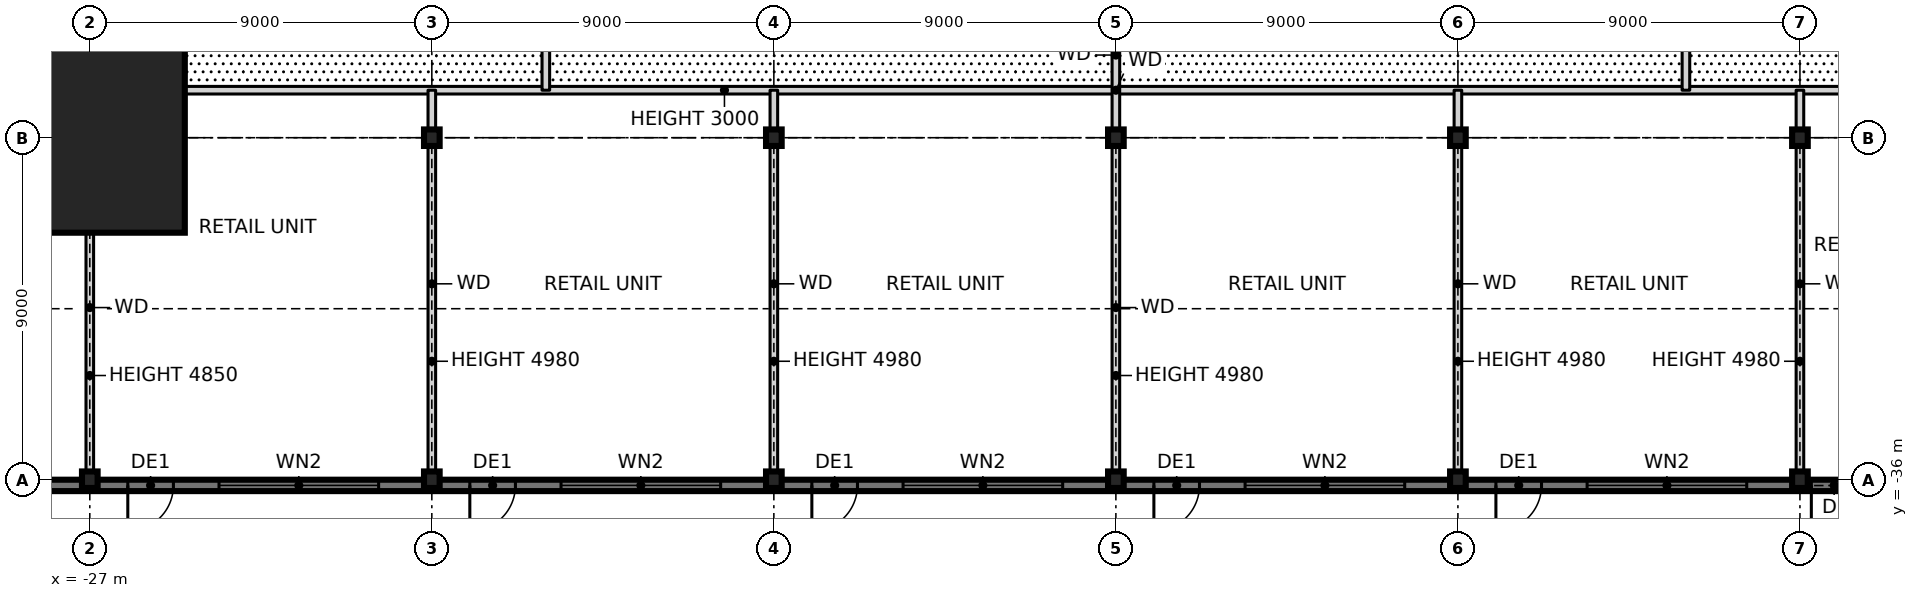
"""IFC4 building model, lengths in metres.
Left out: names, types, materials, properties, quantities, classifications, styles, units other than length and angle.
Written with IfcOpenShell. Run it as: python <this file> out.ifc"""

import sys

from ifc_helpers import new_model, si_unit, direction, frame, frame_2d, origin, origin_2d, place, context, subcontext, project, spatial, rectangle, i_section, extrude, element, fill, save


model = new_model("IFC4")
c1 = context("Model", 3, precision=1e-05, world=origin(), true_north=direction((0.0, 1.0)))
c2 = subcontext(c1, "Body", "Model", "MODEL_VIEW")
j1 = project(units=[si_unit("LENGTHUNIT", "METRE"), si_unit("PLANEANGLEUNIT", "RADIAN")], contexts=[c1])
p1 = place(None, origin())
s1 = spatial("IfcSite", under=j1, at=p1, CompositionType="ELEMENT")
p2 = place(p1, origin())
s2 = spatial("IfcBuilding", under=s1, at=p2, CompositionType="ELEMENT")
p3 = place(p2, origin())
s3 = spatial("IfcBuildingStorey", under=s2, at=p3, CompositionType="ELEMENT", Elevation=0.0)
p4 = place(p3, frame((-27.0, -27.0, 0.0), z_axis=(0.0, 0.0, 1.0), x_axis=(1.0, 0.0, 0.0)))
e1 = element("IfcColumn", 1, at=p4, inside=s3, PredefinedType="COLUMN", context=c2, shape_type="SweptSolid", body=[
    extrude(rectangle(XDim=5.0, YDim=5.0, at=origin_2d()), origin(), (0.0, 0.0, 1.0), 6.0),
    extrude(i_section(OverallWidth=0.478, OverallDepth=0.599, WebThickness=0.1, FlangeThickness=0.14, at=origin_2d()), origin(), (0.0, 0.0, 1.0), 6.0),
])
for number, where, z_axis, x_axis in (
    (2, (-27.0, -36.0, 0.0), (0.0, 0.0, 1.0), (1.0, 0.0, 0.0)),
    (3, (-18.0, -36.0, 0.0), (0.0, 0.0, 1.0), (1.0, 0.0, 0.0)),
    (4, (-18.0, -27.0, 0.0), (0.0, 0.0, 1.0), (1.0, 0.0, 0.0)),
    (5, (-9.0, -36.0, 0.0), (0.0, 0.0, 1.0), (1.0, 0.0, 0.0)),
    (6, (-9.0, -27.0, 0.0), (0.0, 0.0, 1.0), (1.0, 0.0, 0.0)),
    (7, (0.0, -36.0, 0.0), (0.0, 0.0, 1.0), (1.0, 0.0, 0.0)),
    (8, (0.0, -27.0, 0.0), (0.0, 0.0, 1.0), (1.0, 0.0, 0.0)),
    (9, (9.0, -36.0, 0.0), (0.0, 0.0, 1.0), (1.0, 0.0, 0.0)),
    (10, (9.0, -27.0, 0.0), (0.0, 0.0, 1.0), (1.0, 0.0, 0.0)),
    (11, (18.0, -36.0, 0.0), (0.0, 0.0, 1.0), (1.0, 0.0, 0.0)),
    (12, (18.0, -27.0, 0.0), (0.0, 0.0, 1.0), (1.0, 0.0, 0.0)),
):
    element("IfcColumn", number, at=place(p3, frame(where, z_axis=z_axis, x_axis=x_axis)), inside=s3, PredefinedType="COLUMN", context=c2, shape_type="SweptSolid", body=[
        extrude(i_section(OverallWidth=0.411, OverallDepth=0.434, WebThickness=0.036, FlangeThickness=0.057, at=origin_2d()), origin(), (0.0, 0.0, 1.0), 6.0),
    ])
p5 = place(p3, frame((-36.0, -36.15, -0.25), z_axis=(0.0, 0.0, 1.0), x_axis=(1.0, 0.0, 0.0)))
e13 = element("IfcWall", 13, at=p5, inside=s3, PredefinedType="SOLIDWALL", context=c2, shape_type="SweptSolid", body=[
    extrude(rectangle(XDim=9.0, YDim=0.3, at=frame_2d((4.5, 0.0))), origin(), (0.0, 0.0, 1.0), 6.25),
])
p6 = place(p5, frame((1.0, 0.0, 0.25)))
e14 = element("IfcOpeningElement", 14, at=p6, cuts=e13, PredefinedType="OPENING", context=c2, shape_type="SweptSolid", body=[
    extrude(rectangle(XDim=1.2, YDim=2.4, at=frame_2d((0.6, 1.2))), frame((0.0, 0.16, 0.0), z_axis=(0.0, -1.0, 0.0), x_axis=(1.0, 0.0, 0.0)), (0.0, 0.0, 1.0), 0.32),
])
p7 = place(p5, frame((3.4, 0.0, 0.85)))
e15 = element("IfcOpeningElement", 15, at=p7, cuts=e13, PredefinedType="OPENING", context=c2, shape_type="SweptSolid", body=[
    extrude(rectangle(XDim=4.2, YDim=3.6, at=frame_2d((2.1, 1.8))), frame((0.0, 0.16, 0.0), z_axis=(0.0, -1.0, 0.0), x_axis=(1.0, 0.0, 0.0)), (0.0, 0.0, 1.0), 0.32),
])
p8 = place(p3, frame((-27.0, -36.15, -0.25), z_axis=(0.0, 0.0, 1.0), x_axis=(1.0, 0.0, 0.0)))
e16 = element("IfcWall", 16, at=p8, inside=s3, PredefinedType="SOLIDWALL", context=c2, shape_type="SweptSolid", body=[
    extrude(rectangle(XDim=9.0, YDim=0.3, at=frame_2d((4.5, 0.0))), origin(), (0.0, 0.0, 1.0), 6.25),
])
p9 = place(p8, frame((1.0, 0.0, 0.25)))
e17 = element("IfcOpeningElement", 17, at=p9, cuts=e16, PredefinedType="OPENING", context=c2, shape_type="SweptSolid", body=[
    extrude(rectangle(XDim=1.2, YDim=2.4, at=frame_2d((0.6, 1.2))), frame((0.0, 0.16, 0.0), z_axis=(0.0, -1.0, 0.0), x_axis=(1.0, 0.0, 0.0)), (0.0, 0.0, 1.0), 0.32),
])
p10 = place(p8, frame((3.4, 0.0, 0.85)))
e18 = element("IfcOpeningElement", 18, at=p10, cuts=e16, PredefinedType="OPENING", context=c2, shape_type="SweptSolid", body=[
    extrude(rectangle(XDim=4.2, YDim=3.6, at=frame_2d((2.1, 1.8))), frame((0.0, 0.16, 0.0), z_axis=(0.0, -1.0, 0.0), x_axis=(1.0, 0.0, 0.0)), (0.0, 0.0, 1.0), 0.32),
])
p11 = place(p3, frame((-18.0, -36.15, -0.25), z_axis=(0.0, 0.0, 1.0), x_axis=(1.0, 0.0, 0.0)))
e19 = element("IfcWall", 19, at=p11, inside=s3, PredefinedType="SOLIDWALL", context=c2, shape_type="SweptSolid", body=[
    extrude(rectangle(XDim=9.0, YDim=0.3, at=frame_2d((4.5, 0.0))), origin(), (0.0, 0.0, 1.0), 6.25),
])
p12 = place(p11, frame((1.0, 0.0, 0.25)))
e20 = element("IfcOpeningElement", 20, at=p12, cuts=e19, PredefinedType="OPENING", context=c2, shape_type="SweptSolid", body=[
    extrude(rectangle(XDim=1.2, YDim=2.4, at=frame_2d((0.6, 1.2))), frame((0.0, 0.16, 0.0), z_axis=(0.0, -1.0, 0.0), x_axis=(1.0, 0.0, 0.0)), (0.0, 0.0, 1.0), 0.32),
])
p13 = place(p11, frame((3.4, 0.0, 0.85)))
e21 = element("IfcOpeningElement", 21, at=p13, cuts=e19, PredefinedType="OPENING", context=c2, shape_type="SweptSolid", body=[
    extrude(rectangle(XDim=4.2, YDim=3.6, at=frame_2d((2.1, 1.8))), frame((0.0, 0.16, 0.0), z_axis=(0.0, -1.0, 0.0), x_axis=(1.0, 0.0, 0.0)), (0.0, 0.0, 1.0), 0.32),
])
p14 = place(p3, frame((-9.0, -36.15, -0.25), z_axis=(0.0, 0.0, 1.0), x_axis=(1.0, 0.0, 0.0)))
e22 = element("IfcWall", 22, at=p14, inside=s3, PredefinedType="SOLIDWALL", context=c2, shape_type="SweptSolid", body=[
    extrude(rectangle(XDim=9.0, YDim=0.3, at=frame_2d((4.5, 0.0))), origin(), (0.0, 0.0, 1.0), 6.25),
])
p15 = place(p14, frame((1.0, 0.0, 0.25)))
e23 = element("IfcOpeningElement", 23, at=p15, cuts=e22, PredefinedType="OPENING", context=c2, shape_type="SweptSolid", body=[
    extrude(rectangle(XDim=1.2, YDim=2.4, at=frame_2d((0.6, 1.2))), frame((0.0, 0.16, 0.0), z_axis=(0.0, -1.0, 0.0), x_axis=(1.0, 0.0, 0.0)), (0.0, 0.0, 1.0), 0.32),
])
p16 = place(p14, frame((3.4, 0.0, 0.85)))
e24 = element("IfcOpeningElement", 24, at=p16, cuts=e22, PredefinedType="OPENING", context=c2, shape_type="SweptSolid", body=[
    extrude(rectangle(XDim=4.2, YDim=3.6, at=frame_2d((2.1, 1.8))), frame((0.0, 0.16, 0.0), z_axis=(0.0, -1.0, 0.0), x_axis=(1.0, 0.0, 0.0)), (0.0, 0.0, 1.0), 0.32),
])
p17 = place(p3, frame((0.0, -36.15, -0.25), z_axis=(0.0, 0.0, 1.0), x_axis=(1.0, 0.0, 0.0)))
e25 = element("IfcWall", 25, at=p17, inside=s3, PredefinedType="SOLIDWALL", context=c2, shape_type="SweptSolid", body=[
    extrude(rectangle(XDim=9.0, YDim=0.3, at=frame_2d((4.5, 0.0))), origin(), (0.0, 0.0, 1.0), 6.25),
])
p18 = place(p17, frame((1.0, 0.0, 0.25)))
e26 = element("IfcOpeningElement", 26, at=p18, cuts=e25, PredefinedType="OPENING", context=c2, shape_type="SweptSolid", body=[
    extrude(rectangle(XDim=1.2, YDim=2.4, at=frame_2d((0.6, 1.2))), frame((0.0, 0.16, 0.0), z_axis=(0.0, -1.0, 0.0), x_axis=(1.0, 0.0, 0.0)), (0.0, 0.0, 1.0), 0.32),
])
p19 = place(p17, frame((3.4, 0.0, 0.85)))
e27 = element("IfcOpeningElement", 27, at=p19, cuts=e25, PredefinedType="OPENING", context=c2, shape_type="SweptSolid", body=[
    extrude(rectangle(XDim=4.2, YDim=3.6, at=frame_2d((2.1, 1.8))), frame((0.0, 0.16, 0.0), z_axis=(0.0, -1.0, 0.0), x_axis=(1.0, 0.0, 0.0)), (0.0, 0.0, 1.0), 0.32),
])
p20 = place(p3, frame((9.0, -36.15, -0.25), z_axis=(0.0, 0.0, 1.0), x_axis=(1.0, 0.0, 0.0)))
e28 = element("IfcWall", 28, at=p20, inside=s3, PredefinedType="SOLIDWALL", context=c2, shape_type="SweptSolid", body=[
    extrude(rectangle(XDim=9.0, YDim=0.3, at=frame_2d((4.5, 0.0))), origin(), (0.0, 0.0, 1.0), 6.25),
])
p21 = place(p20, frame((1.0, 0.0, 0.25)))
e29 = element("IfcOpeningElement", 29, at=p21, cuts=e28, PredefinedType="OPENING", context=c2, shape_type="SweptSolid", body=[
    extrude(rectangle(XDim=1.2, YDim=2.4, at=frame_2d((0.6, 1.2))), frame((0.0, 0.16, 0.0), z_axis=(0.0, -1.0, 0.0), x_axis=(1.0, 0.0, 0.0)), (0.0, 0.0, 1.0), 0.32),
])
p22 = place(p20, frame((3.4, 0.0, 0.85)))
e30 = element("IfcOpeningElement", 30, at=p22, cuts=e28, PredefinedType="OPENING", context=c2, shape_type="SweptSolid", body=[
    extrude(rectangle(XDim=4.2, YDim=3.6, at=frame_2d((2.1, 1.8))), frame((0.0, 0.16, 0.0), z_axis=(0.0, -1.0, 0.0), x_axis=(1.0, 0.0, 0.0)), (0.0, 0.0, 1.0), 0.32),
])
p23 = place(p3, frame((18.0, -36.15, -0.25), z_axis=(0.0, 0.0, 1.0), x_axis=(1.0, 0.0, 0.0)))
e31 = element("IfcWall", 31, at=p23, inside=s3, PredefinedType="SOLIDWALL", context=c2, shape_type="SweptSolid", body=[
    extrude(rectangle(XDim=9.0, YDim=0.3, at=frame_2d((4.5, 0.0))), origin(), (0.0, 0.0, 1.0), 6.25),
])
p24 = place(p23, frame((0.3, 0.0, 0.25)))
e32 = element("IfcOpeningElement", 32, at=p24, cuts=e31, PredefinedType="OPENING", context=c2, shape_type="SweptSolid", body=[
    extrude(rectangle(XDim=1.2, YDim=2.4, at=frame_2d((0.6, 1.2))), frame((0.0, 0.16, 0.0), z_axis=(0.0, -1.0, 0.0), x_axis=(1.0, 0.0, 0.0)), (0.0, 0.0, 1.0), 0.32),
])
p25 = place(p23, frame((1.85, 0.0, 0.25)))
e33 = element("IfcOpeningElement", 33, at=p25, cuts=e31, PredefinedType="OPENING", context=c2, shape_type="SweptSolid", body=[
    extrude(rectangle(XDim=1.2, YDim=2.4, at=frame_2d((0.6, 1.2))), frame((0.0, 0.16, 0.0), z_axis=(0.0, -1.0, 0.0), x_axis=(1.0, 0.0, 0.0)), (0.0, 0.0, 1.0), 0.32),
])
p26 = place(p3, frame((-35.94, -27.0, 0.0), z_axis=(0.0, 0.0, 1.0), x_axis=(1.0, 0.0, 0.0)))
e34 = element("IfcWall", 34, at=p26, inside=s3, PredefinedType="SOLIDWALL", context=c2, shape_type="SweptSolid", body=[
    extrude(rectangle(XDim=10.19, YDim=0.2, at=frame_2d((5.095, 0.0))), origin(), (0.0, 0.0, 1.0), 4.85),
])
p27 = place(p3, frame((-25.75, -25.75, 0.0), z_axis=(0.0, 0.0, 1.0), x_axis=(1.0, 0.0, 0.0)))
e35 = element("IfcWall", 35, at=p27, inside=s3, PredefinedType="SOLIDWALL", context=c2, shape_type="SweptSolid", body=[
    extrude(rectangle(XDim=51.5, YDim=0.2, at=frame_2d((25.75, 0.0))), origin(), (0.0, 0.0, 1.0), 3.0),
])
p28 = place(p3, frame((18.0, -35.94, 0.0), z_axis=(0.0, 0.0, 1.0), x_axis=(0.0, 1.0, 0.0)))
e36 = element("IfcWall", 36, at=p28, inside=s3, PredefinedType="SOLIDWALL", context=c2, shape_type="SweptSolid", body=[
    extrude(rectangle(XDim=10.19, YDim=0.2, at=frame_2d((5.095, 0.0))), origin(), (0.0, 0.0, 1.0), 4.98),
])
p29 = place(p3, frame((15.0, -25.75, 0.0), z_axis=(0.0, 0.0, 1.0), x_axis=(0.0, 1.0, 0.0)))
e37 = element("IfcWall", 37, at=p29, inside=s3, PredefinedType="SOLIDWALL", context=c2, shape_type="SweptSolid", body=[
    extrude(rectangle(XDim=22.75, YDim=0.2, at=frame_2d((11.375, 0.0))), origin(), (0.0, 0.0, 1.0), 5.75),
])
p30 = place(p29, frame((15.85, 0.0, 0.0)))
e38 = element("IfcOpeningElement", 38, at=p30, cuts=e37, PredefinedType="OPENING", context=c2, shape_type="SweptSolid", body=[
    extrude(rectangle(XDim=1.8, YDim=2.1, at=frame_2d((0.9, 1.05))), frame((0.0, 0.11, 0.0), z_axis=(0.0, -1.0, 0.0), x_axis=(1.0, 0.0, 0.0)), (0.0, 0.0, 1.0), 0.22),
])
p31 = place(p3, frame((9.0, -35.94, 0.0), z_axis=(0.0, 0.0, 1.0), x_axis=(0.0, 1.0, 0.0)))
e39 = element("IfcWall", 39, at=p31, inside=s3, PredefinedType="SOLIDWALL", context=c2, shape_type="SweptSolid", body=[
    extrude(rectangle(XDim=10.19, YDim=0.2, at=frame_2d((5.095, 0.0))), origin(), (0.0, 0.0, 1.0), 4.98),
])
p32 = place(p3, frame((0.0, -35.94, 0.0), z_axis=(0.0, 0.0, 1.0), x_axis=(0.0, 1.0, 0.0)))
e40 = element("IfcWall", 40, at=p32, inside=s3, PredefinedType="SOLIDWALL", context=c2, shape_type="SweptSolid", body=[
    extrude(rectangle(XDim=8.94, YDim=0.2, at=frame_2d((4.47, 0.0))), origin(), (0.0, 0.0, 1.0), 4.98),
])
p33 = place(p3, frame((-9.0, -35.94, 0.0), z_axis=(0.0, 0.0, 1.0), x_axis=(0.0, 1.0, 0.0)))
e41 = element("IfcWall", 41, at=p33, inside=s3, PredefinedType="SOLIDWALL", context=c2, shape_type="SweptSolid", body=[
    extrude(rectangle(XDim=10.19, YDim=0.2, at=frame_2d((5.095, 0.0))), origin(), (0.0, 0.0, 1.0), 4.98),
])
p34 = place(p3, frame((-15.0, -25.75, 0.0), z_axis=(0.0, 0.0, 1.0), x_axis=(0.0, 1.0, 0.0)))
e42 = element("IfcWall", 42, at=p34, inside=s3, PredefinedType="SOLIDWALL", context=c2, shape_type="SweptSolid", body=[
    extrude(rectangle(XDim=51.5, YDim=0.2, at=frame_2d((25.75, 0.0))), origin(), (0.0, 0.0, 1.0), 5.75),
])
p35 = place(p34, frame((33.85, 0.0, 0.0)))
e43 = element("IfcOpeningElement", 43, at=p35, cuts=e42, PredefinedType="OPENING", context=c2, shape_type="SweptSolid", body=[
    extrude(rectangle(XDim=1.8, YDim=2.1, at=frame_2d((0.9, 1.05))), frame((0.0, 0.11, 0.0), z_axis=(0.0, -1.0, 0.0), x_axis=(1.0, 0.0, 0.0)), (0.0, 0.0, 1.0), 0.22),
])
p36 = place(p34, frame((24.85, 0.0, 0.0)))
e44 = element("IfcOpeningElement", 44, at=p36, cuts=e42, PredefinedType="OPENING", context=c2, shape_type="SweptSolid", body=[
    extrude(rectangle(XDim=1.8, YDim=2.1, at=frame_2d((0.9, 1.05))), frame((0.0, 0.11, 0.0), z_axis=(0.0, -1.0, 0.0), x_axis=(1.0, 0.0, 0.0)), (0.0, 0.0, 1.0), 0.22),
])
p37 = place(p34, frame((15.85, 0.0, 0.0)))
e45 = element("IfcOpeningElement", 45, at=p37, cuts=e42, PredefinedType="OPENING", context=c2, shape_type="SweptSolid", body=[
    extrude(rectangle(XDim=1.8, YDim=2.1, at=frame_2d((0.9, 1.05))), frame((0.0, 0.11, 0.0), z_axis=(0.0, -1.0, 0.0), x_axis=(1.0, 0.0, 0.0)), (0.0, 0.0, 1.0), 0.22),
])
p38 = place(p3, frame((-18.0, -35.94, 0.0), z_axis=(0.0, 0.0, 1.0), x_axis=(0.0, 1.0, 0.0)))
e46 = element("IfcWall", 46, at=p38, inside=s3, PredefinedType="SOLIDWALL", context=c2, shape_type="SweptSolid", body=[
    extrude(rectangle(XDim=10.19, YDim=0.2, at=frame_2d((5.095, 0.0))), origin(), (0.0, 0.0, 1.0), 4.98),
])
p39 = place(p3, frame((-25.75, -27.0, 0.0), z_axis=(0.0, 0.0, 1.0), x_axis=(0.0, 1.0, 0.0)))
e47 = element("IfcWall", 47, at=p39, inside=s3, PredefinedType="SOLIDWALL", context=c2, shape_type="SweptSolid", body=[
    extrude(rectangle(XDim=54.0, YDim=0.2, at=frame_2d((27.0, 0.0))), origin(), (0.0, 0.0, 1.0), 5.75),
])
p40 = place(p3, frame((-27.0, -35.94, 0.0), z_axis=(0.0, 0.0, 1.0), x_axis=(0.0, 1.0, 0.0)))
e48 = element("IfcWall", 48, at=p40, inside=s3, PredefinedType="SOLIDWALL", context=c2, shape_type="SweptSolid", body=[
    extrude(rectangle(XDim=8.94, YDim=0.2, at=frame_2d((4.47, 0.0))), origin(), (0.0, 0.0, 1.0), 4.85),
])
p41 = place(p3, frame((0.0, -27.0, 0.0), z_axis=(0.0, 0.0, 1.0), x_axis=(0.0, 1.0, 0.0)))
e49 = element("IfcWall", 49, at=p41, inside=s3, PredefinedType="SOLIDWALL", context=c2, shape_type="SweptSolid", body=[
    extrude(rectangle(XDim=4.35, YDim=0.2, at=frame_2d((2.175, 0.0))), origin(), (0.0, 0.0, 1.0), 5.75),
])
p42 = place(p9, frame((1.2, 0.0, 0.0), z_axis=(0.0, 0.0, 1.0), x_axis=(-1.0, 0.0, 0.0)))
e50 = element("IfcDoor", 50, at=p42, inside=s3, OperationType="SINGLE_SWING_RIGHT", PredefinedType="DOOR", context=c2, shape_type="SweptSolid", body=[
    extrude(rectangle(XDim=1.2, YDim=2.4, at=frame_2d((0.6, 1.2))), frame((0.0, 0.025, 0.0), z_axis=(0.0, -1.0, 0.0), x_axis=(1.0, 0.0, 0.0)), (0.0, 0.0, 1.0), 0.05),
])
fill(e17, e50)
p43 = place(p10, origin())
e51 = element("IfcWindow", 51, at=p43, inside=s3, PartitioningType="SINGLE_PANEL", PredefinedType="WINDOW", context=c2, shape_type="SweptSolid", body=[
    extrude(rectangle(XDim=4.2, YDim=3.6, at=frame_2d((2.1, 1.8))), frame((0.0, 0.03, 0.0), z_axis=(0.0, -1.0, 0.0), x_axis=(1.0, 0.0, 0.0)), (0.0, 0.0, 1.0), 0.06),
])
fill(e18, e51)
p44 = place(p12, frame((1.2, 0.0, 0.0), z_axis=(0.0, 0.0, 1.0), x_axis=(-1.0, 0.0, 0.0)))
e52 = element("IfcDoor", 52, at=p44, inside=s3, OperationType="SINGLE_SWING_RIGHT", PredefinedType="DOOR", context=c2, shape_type="SweptSolid", body=[
    extrude(rectangle(XDim=1.2, YDim=2.4, at=frame_2d((0.6, 1.2))), frame((0.0, 0.025, 0.0), z_axis=(0.0, -1.0, 0.0), x_axis=(1.0, 0.0, 0.0)), (0.0, 0.0, 1.0), 0.05),
])
fill(e20, e52)
p45 = place(p13, origin())
e53 = element("IfcWindow", 53, at=p45, inside=s3, PartitioningType="SINGLE_PANEL", PredefinedType="WINDOW", context=c2, shape_type="SweptSolid", body=[
    extrude(rectangle(XDim=4.2, YDim=3.6, at=frame_2d((2.1, 1.8))), frame((0.0, 0.03, 0.0), z_axis=(0.0, -1.0, 0.0), x_axis=(1.0, 0.0, 0.0)), (0.0, 0.0, 1.0), 0.06),
])
fill(e21, e53)
p46 = place(p15, frame((1.2, 0.0, 0.0), z_axis=(0.0, 0.0, 1.0), x_axis=(-1.0, 0.0, 0.0)))
e54 = element("IfcDoor", 54, at=p46, inside=s3, OperationType="SINGLE_SWING_RIGHT", PredefinedType="DOOR", context=c2, shape_type="SweptSolid", body=[
    extrude(rectangle(XDim=1.2, YDim=2.4, at=frame_2d((0.6, 1.2))), frame((0.0, 0.025, 0.0), z_axis=(0.0, -1.0, 0.0), x_axis=(1.0, 0.0, 0.0)), (0.0, 0.0, 1.0), 0.05),
])
fill(e23, e54)
p47 = place(p16, origin())
e55 = element("IfcWindow", 55, at=p47, inside=s3, PartitioningType="SINGLE_PANEL", PredefinedType="WINDOW", context=c2, shape_type="SweptSolid", body=[
    extrude(rectangle(XDim=4.2, YDim=3.6, at=frame_2d((2.1, 1.8))), frame((0.0, 0.03, 0.0), z_axis=(0.0, -1.0, 0.0), x_axis=(1.0, 0.0, 0.0)), (0.0, 0.0, 1.0), 0.06),
])
fill(e24, e55)
p48 = place(p18, frame((1.2, 0.0, 0.0), z_axis=(0.0, 0.0, 1.0), x_axis=(-1.0, 0.0, 0.0)))
e56 = element("IfcDoor", 56, at=p48, inside=s3, OperationType="SINGLE_SWING_RIGHT", PredefinedType="DOOR", context=c2, shape_type="SweptSolid", body=[
    extrude(rectangle(XDim=1.2, YDim=2.4, at=frame_2d((0.6, 1.2))), frame((0.0, 0.025, 0.0), z_axis=(0.0, -1.0, 0.0), x_axis=(1.0, 0.0, 0.0)), (0.0, 0.0, 1.0), 0.05),
])
fill(e26, e56)
p49 = place(p19, origin())
e57 = element("IfcWindow", 57, at=p49, inside=s3, PartitioningType="SINGLE_PANEL", PredefinedType="WINDOW", context=c2, shape_type="SweptSolid", body=[
    extrude(rectangle(XDim=4.2, YDim=3.6, at=frame_2d((2.1, 1.8))), frame((0.0, 0.03, 0.0), z_axis=(0.0, -1.0, 0.0), x_axis=(1.0, 0.0, 0.0)), (0.0, 0.0, 1.0), 0.06),
])
fill(e27, e57)
p50 = place(p21, frame((1.2, 0.0, 0.0), z_axis=(0.0, 0.0, 1.0), x_axis=(-1.0, 0.0, 0.0)))
e58 = element("IfcDoor", 58, at=p50, inside=s3, OperationType="SINGLE_SWING_RIGHT", PredefinedType="DOOR", context=c2, shape_type="SweptSolid", body=[
    extrude(rectangle(XDim=1.2, YDim=2.4, at=frame_2d((0.6, 1.2))), frame((0.0, 0.025, 0.0), z_axis=(0.0, -1.0, 0.0), x_axis=(1.0, 0.0, 0.0)), (0.0, 0.0, 1.0), 0.05),
])
fill(e29, e58)
p51 = place(p22, origin())
e59 = element("IfcWindow", 59, at=p51, inside=s3, PartitioningType="SINGLE_PANEL", PredefinedType="WINDOW", context=c2, shape_type="SweptSolid", body=[
    extrude(rectangle(XDim=4.2, YDim=3.6, at=frame_2d((2.1, 1.8))), frame((0.0, 0.03, 0.0), z_axis=(0.0, -1.0, 0.0), x_axis=(1.0, 0.0, 0.0)), (0.0, 0.0, 1.0), 0.06),
])
fill(e30, e59)
p52 = place(p24, frame((1.2, 0.0, 0.0), z_axis=(0.0, 0.0, 1.0), x_axis=(-1.0, 0.0, 0.0)))
e60 = element("IfcDoor", 60, at=p52, inside=s3, OperationType="SINGLE_SWING_RIGHT", PredefinedType="DOOR", context=c2, shape_type="SweptSolid", body=[
    extrude(rectangle(XDim=1.2, YDim=2.4, at=frame_2d((0.6, 1.2))), frame((0.0, 0.025, 0.0), z_axis=(0.0, -1.0, 0.0), x_axis=(1.0, 0.0, 0.0)), (0.0, 0.0, 1.0), 0.05),
])
fill(e32, e60)
save(model, sys.argv[1])
